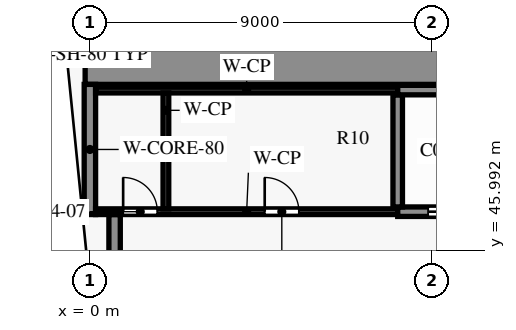
"""IFC4 building model, lengths in metres.
Left out: names, types, materials, properties, quantities, classifications, styles, units other than length and angle.
Written with IfcOpenShell. Run it as: python <this file> out.ifc"""

import sys

from ifc_helpers import new_model, si_unit, direction, frame, frame_2d, origin, place, context, subcontext, project, spatial, rectangle, extrude, element, fill, save


model = new_model("IFC4")
c1 = context("Model", 3, precision=1e-05, world=origin(), true_north=direction((0.0, 1.0)))
c2 = subcontext(c1, "Body", "Model", "MODEL_VIEW")
j1 = project(units=[si_unit("LENGTHUNIT", "METRE"), si_unit("PLANEANGLEUNIT", "RADIAN")], contexts=[c1])
p1 = place(None, origin())
s1 = spatial("IfcSite", under=j1, at=p1, CompositionType="ELEMENT")
p2 = place(p1, origin())
s2 = spatial("IfcBuilding", under=s1, at=p2, CompositionType="ELEMENT")
p3 = place(p2, frame((0.0, 0.0, 14.5)))
s3 = spatial("IfcBuildingStorey", under=s2, at=p3, CompositionType="ELEMENT", Elevation=14.5)
p4 = place(p3, frame((0.15, 47.0, 0.0), z_axis=(0.0, 0.0, 1.0), x_axis=(1.0, 0.0, 0.0)))
e1 = element("IfcWall", 1, at=p4, inside=s3, PredefinedType="PARTITIONING", context=c2, shape_type="SweptSolid", body=[
    extrude(rectangle(XDim=7.95, YDim=0.15, at=frame_2d((3.975, 0.0))), origin(), (0.0, 0.0, 1.0), 4.7),
])
p5 = place(p4, frame((0.725, 0.0, 0.0)))
e2 = element("IfcOpeningElement", 2, at=p5, cuts=e1, PredefinedType="OPENING", context=c2, shape_type="SweptSolid", body=[
    extrude(rectangle(XDim=0.9, YDim=2.1, at=frame_2d((0.45, 1.05))), frame((0.0, 0.085, 0.0), z_axis=(0.0, -1.0, 0.0), x_axis=(1.0, 0.0, 0.0)), (0.0, 0.0, 1.0), 0.17),
])
p6 = place(p4, frame((4.45, 0.0, 0.0)))
e3 = element("IfcOpeningElement", 3, at=p6, cuts=e1, PredefinedType="OPENING", context=c2, shape_type="SweptSolid", body=[
    extrude(rectangle(XDim=0.9, YDim=2.1, at=frame_2d((0.45, 1.05))), frame((0.0, 0.085, 0.0), z_axis=(0.0, -1.0, 0.0), x_axis=(1.0, 0.0, 0.0)), (0.0, 0.0, 1.0), 0.17),
])
p7 = place(p3, frame((8.1, 47.0, 0.0), z_axis=(0.0, 0.0, 1.0), x_axis=(1.0, 0.0, 0.0)))
e4 = element("IfcWall", 4, at=p7, inside=s3, PredefinedType="SHEAR", context=c2, shape_type="SweptSolid", body=[
    extrude(rectangle(XDim=13.5, YDim=0.25, at=frame_2d((6.75, 0.0))), origin(), (0.0, 0.0, 1.0), 4.7),
])
p8 = place(p7, frame((0.8, 0.0, 0.0)))
e5 = element("IfcOpeningElement", 5, at=p8, cuts=e4, PredefinedType="OPENING", context=c2, shape_type="SweptSolid", body=[
    extrude(rectangle(XDim=1.1, YDim=2.1, at=frame_2d((0.55, 1.05))), frame((0.0, 0.135, 0.0), z_axis=(0.0, -1.0, 0.0), x_axis=(1.0, 0.0, 0.0)), (0.0, 0.0, 1.0), 0.27),
])
p9 = place(p7, frame((3.5, 0.0, 0.0)))
e6 = element("IfcOpeningElement", 6, at=p9, cuts=e4, PredefinedType="OPENING", context=c2, shape_type="SweptSolid", body=[
    extrude(rectangle(XDim=1.1, YDim=2.1, at=frame_2d((0.55, 1.05))), frame((0.0, 0.135, 0.0), z_axis=(0.0, -1.0, 0.0), x_axis=(1.0, 0.0, 0.0)), (0.0, 0.0, 1.0), 0.27),
])
p10 = place(p7, frame((6.2, 0.0, 0.0)))
e7 = element("IfcOpeningElement", 7, at=p10, cuts=e4, PredefinedType="OPENING", context=c2, shape_type="SweptSolid", body=[
    extrude(rectangle(XDim=1.1, YDim=2.1, at=frame_2d((0.55, 1.05))), frame((0.0, 0.135, 0.0), z_axis=(0.0, -1.0, 0.0), x_axis=(1.0, 0.0, 0.0)), (0.0, 0.0, 1.0), 0.27),
])
p11 = place(p7, frame((8.9, 0.0, 0.0)))
e8 = element("IfcOpeningElement", 8, at=p11, cuts=e4, PredefinedType="OPENING", context=c2, shape_type="SweptSolid", body=[
    extrude(rectangle(XDim=1.1, YDim=2.1, at=frame_2d((0.55, 1.05))), frame((0.0, 0.135, 0.0), z_axis=(0.0, -1.0, 0.0), x_axis=(1.0, 0.0, 0.0)), (0.0, 0.0, 1.0), 0.27),
])
p12 = place(p7, frame((11.6, 0.0, 0.0)))
e9 = element("IfcOpeningElement", 9, at=p12, cuts=e4, PredefinedType="OPENING", context=c2, shape_type="SweptSolid", body=[
    extrude(rectangle(XDim=1.1, YDim=2.1, at=frame_2d((0.55, 1.05))), frame((0.0, 0.135, 0.0), z_axis=(0.0, -1.0, 0.0), x_axis=(1.0, 0.0, 0.0)), (0.0, 0.0, 1.0), 0.27),
])
p13 = place(p3, frame((0.15, 50.2, 0.0), z_axis=(0.0, 0.0, 1.0), x_axis=(1.0, 0.0, 0.0)))
e10 = element("IfcWall", 10, at=p13, inside=s3, PredefinedType="PARTITIONING", context=c2, shape_type="SweptSolid", body=[
    extrude(rectangle(XDim=7.95, YDim=0.15, at=frame_2d((3.975, 0.0))), origin(), (0.0, 0.0, 1.0), 4.7),
])
p14 = place(p3, frame((8.1, 50.2, 0.0), z_axis=(0.0, 0.0, 1.0), x_axis=(1.0, 0.0, 0.0)))
e11 = element("IfcWall", 11, at=p14, inside=s3, PredefinedType="SHEAR", context=c2, shape_type="SweptSolid", body=[
    extrude(rectangle(XDim=13.375, YDim=0.25, at=frame_2d((6.688, 0.0))), origin(), (0.0, 0.0, 1.0), 4.7),
])
p15 = place(p3, frame((-0.125, 51.0, 0.0), z_axis=(0.0, 0.0, 1.0), x_axis=(1.0, 0.0, 0.0)))
e12 = element("IfcWall", 12, at=p15, inside=s3, PredefinedType="SHEAR", context=c2, shape_type="SweptSolid", body=[
    extrude(rectangle(XDim=21.625, YDim=1.3, at=frame_2d((10.812, 0.0))), origin(), (0.0, 0.0, 1.0), 4.7),
])
p16 = place(p3, frame((0.0, 46.925, 0.0), z_axis=(0.0, 0.0, 1.0), x_axis=(0.0, 1.0, 0.0)))
e13 = element("IfcWall", 13, at=p16, inside=s3, PredefinedType="SHEAR", context=c2, shape_type="SweptSolid", body=[
    extrude(rectangle(XDim=3.425, YDim=0.3, at=frame_2d((1.712, 0.0))), origin(), (0.0, 0.0, 1.0), 4.7),
])
p17 = place(p3, frame((0.65, 43.275, 0.0), z_axis=(0.0, 0.0, 1.0), x_axis=(0.0, 1.0, 0.0)))
e14 = element("IfcWall", 14, at=p17, inside=s3, PredefinedType="SHEAR", context=c2, shape_type="SweptSolid", body=[
    extrude(rectangle(XDim=3.65, YDim=0.3, at=frame_2d((1.825, 0.0))), origin(), (0.0, 0.0, 1.0), 4.7),
])
p18 = place(p3, frame((2.0, 47.075, 0.0), z_axis=(0.0, 0.0, 1.0), x_axis=(0.0, 1.0, 0.0)))
e15 = element("IfcWall", 15, at=p18, inside=s3, PredefinedType="PARTITIONING", context=c2, shape_type="SweptSolid", body=[
    extrude(rectangle(XDim=3.05, YDim=0.15, at=frame_2d((1.525, 0.0))), origin(), (0.0, 0.0, 1.0), 4.7),
])
p19 = place(p3, frame((8.1, 47.125, 0.0), z_axis=(0.0, 0.0, 1.0), x_axis=(0.0, 1.0, 0.0)))
e16 = element("IfcWall", 16, at=p19, inside=s3, PredefinedType="SHEAR", context=c2, shape_type="SweptSolid", body=[
    extrude(rectangle(XDim=2.95, YDim=0.25, at=frame_2d((1.475, 0.0))), origin(), (0.0, 0.0, 1.0), 4.7),
])
p20 = place(p5, origin())
e17 = element("IfcDoor", 17, at=p20, inside=s3, OperationType="SINGLE_SWING_RIGHT", PredefinedType="DOOR", context=c2, shape_type="SweptSolid", body=[
    extrude(rectangle(XDim=0.9, YDim=2.1, at=frame_2d((0.45, 1.05))), frame((0.0, 0.025, 0.0), z_axis=(0.0, -1.0, 0.0), x_axis=(1.0, 0.0, 0.0)), (0.0, 0.0, 1.0), 0.05),
])
fill(e2, e17)
p21 = place(p6, origin())
e18 = element("IfcDoor", 18, at=p21, inside=s3, OperationType="SINGLE_SWING_LEFT", PredefinedType="DOOR", context=c2, shape_type="SweptSolid", body=[
    extrude(rectangle(XDim=0.9, YDim=2.1, at=frame_2d((0.45, 1.05))), frame((0.0, 0.025, 0.0), z_axis=(0.0, -1.0, 0.0), x_axis=(1.0, 0.0, 0.0)), (0.0, 0.0, 1.0), 0.05),
])
fill(e3, e18)
p22 = place(p8, origin())
e19 = element("IfcDoor", 19, at=p22, inside=s3, OperationType="DOUBLE_DOOR_SLIDING", PredefinedType="DOOR", context=c2, shape_type="SweptSolid", body=[
    extrude(rectangle(XDim=1.1, YDim=2.1, at=frame_2d((0.55, 1.05))), frame((0.0, 0.025, 0.0), z_axis=(0.0, -1.0, 0.0), x_axis=(1.0, 0.0, 0.0)), (0.0, 0.0, 1.0), 0.05),
])
fill(e5, e19)
save(model, sys.argv[1])
